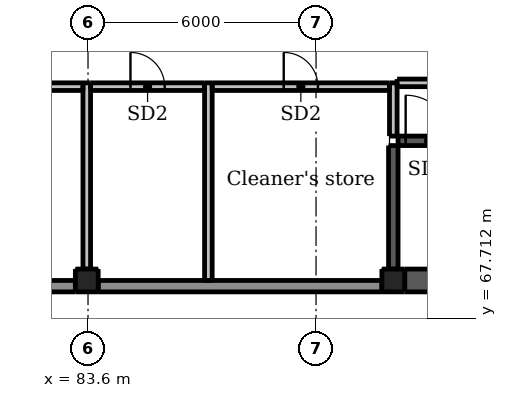
"""IFC4 building model, lengths in metres.
Left out: names, types, materials, properties, quantities, classifications, styles, units other than length and angle.
Written with IfcOpenShell. Run it as: python <this file> out.ifc"""

import sys

from ifc_helpers import new_model, si_unit, direction, frame, frame_2d, origin, origin_2d, place, context, subcontext, project, spatial, rectangle, extrude, element, fill, save


model = new_model("IFC4")
c1 = context("Model", 3, precision=1e-05, world=origin(), true_north=direction((0.0, 1.0)))
c2 = subcontext(c1, "Body", "Model", "MODEL_VIEW")
j1 = project(units=[si_unit("LENGTHUNIT", "METRE"), si_unit("PLANEANGLEUNIT", "RADIAN")], contexts=[c1])
p1 = place(None, origin())
s1 = spatial("IfcSite", under=j1, at=p1, CompositionType="ELEMENT")
p2 = place(p1, origin())
s2 = spatial("IfcBuilding", under=s1, at=p2, CompositionType="ELEMENT")
p3 = place(p2, origin())
s3 = spatial("IfcBuildingStorey", under=s2, at=p3, CompositionType="ELEMENT", Elevation=0.0)
for number, where, z_axis, x_axis in (
    (1, (83.6, 67.4, -2.5), (0.0, 0.0, 1.0), (1.0, 0.0, 0.0)),
    (2, (89.6, 67.4, -2.5), (0.0, 0.0, 1.0), (1.0, 0.0, 0.0)),
):
    element("IfcColumn", number, at=place(p3, frame(where, z_axis=z_axis, x_axis=x_axis)), inside=s3, PredefinedType="COLUMN", context=c2, shape_type="SweptSolid", body=[
        extrude(rectangle(XDim=1.2, YDim=1.2, at=origin_2d()), origin(), (0.0, 0.0, 1.0), 7.7),
    ])
for number, where, z_axis, x_axis in (
    (3, (83.567, 68.7, -0.3), (0.0, 0.0, 1.0), (1.0, 0.0, 0.0)),
    (4, (91.633, 68.7, -0.3), (0.0, 0.0, 1.0), (1.0, 0.0, 0.0)),
):
    element("IfcColumn", number, at=place(p3, frame(where, z_axis=z_axis, x_axis=x_axis)), inside=s3, PredefinedType="COLUMN", context=c2, shape_type="SweptSolid", body=[
        extrude(rectangle(XDim=0.6, YDim=0.6, at=origin_2d()), origin(), (0.0, 0.0, 1.0), 5.5),
    ])
p4 = place(p3, frame((91.758, 72.375, -0.3), z_axis=(0.0, 0.0, 1.0), x_axis=(1.0, 0.0, 0.0)))
e5 = element("IfcWall", 5, at=p4, inside=s3, PredefinedType="SHEAR", context=c2, shape_type="SweptSolid", body=[
    extrude(rectangle(XDim=7.642, YDim=0.25, at=frame_2d((3.821, 0.0))), origin(), (0.0, 0.0, 1.0), 5.5),
])
p5 = place(p4, frame((0.2, 0.0, 0.3)))
e6 = element("IfcOpeningElement", 6, at=p5, cuts=e5, PredefinedType="OPENING", context=c2, shape_type="SweptSolid", body=[
    extrude(rectangle(XDim=1.2, YDim=2.1, at=frame_2d((0.6, 1.05))), frame((0.0, 0.135, 0.0), z_axis=(0.0, -1.0, 0.0), x_axis=(1.0, 0.0, 0.0)), (0.0, 0.0, 1.0), 0.27),
])
p6 = place(p3, frame((91.633, 69.0, -0.3), z_axis=(0.0, 0.0, 1.0), x_axis=(0.0, 1.0, 0.0)))
e7 = element("IfcWall", 7, at=p6, inside=s3, PredefinedType="SHEAR", context=c2, shape_type="SweptSolid", body=[
    extrude(rectangle(XDim=3.25, YDim=0.25, at=frame_2d((1.625, 0.0))), origin(), (0.0, 0.0, 1.0), 5.5),
])
p7 = place(p3, frame((91.933, 68.7, -0.3), z_axis=(0.0, 0.0, 1.0), x_axis=(1.0, 0.0, 0.0)))
e8 = element("IfcWall", 8, at=p7, inside=s3, PredefinedType="SHEAR", context=c2, shape_type="SweptSolid", body=[
    extrude(rectangle(XDim=7.467, YDim=0.6, at=frame_2d((3.733, 0.0))), origin(), (0.0, 0.0, 1.0), 5.5),
])
for number, where, z_axis, x_axis in (
    (9, (78.2, 67.875, 0.0), (0.0, 0.0, 1.0), (1.0, 0.0, 0.0)),
    (10, (84.2, 67.875, 0.0), (0.0, 0.0, 1.0), (1.0, 0.0, 0.0)),
):
    element("IfcWall", number, at=place(p3, frame(where, z_axis=z_axis, x_axis=x_axis)), inside=s3, PredefinedType="SOLIDWALL", context=c2, shape_type="SweptSolid", body=[
        extrude(rectangle(XDim=4.8, YDim=0.25, at=frame_2d((2.4, 0.0))), origin(), (0.0, 0.0, 1.0), 5.2),
    ])
p8 = place(p3, frame((90.2, 67.875, 0.0), z_axis=(0.0, 0.0, 1.0), x_axis=(1.0, 0.0, 0.0)))
e11 = element("IfcWall", 11, at=p8, inside=s3, PredefinedType="SOLIDWALL", context=c2, shape_type="SweptSolid", body=[
    extrude(rectangle(XDim=9.8, YDim=0.25, at=frame_2d((4.9, 0.0))), origin(), (0.0, 0.0, 1.0), 5.2),
])
p9 = place(p3, frame((75.8, 68.55, 0.0), z_axis=(0.0, 0.0, 1.0), x_axis=(1.0, 0.0, 0.0)))
e12 = element("IfcWall", 12, at=p9, inside=s3, PredefinedType="SOLIDWALL", context=c2, shape_type="SweptSolid", body=[
    extrude(rectangle(XDim=7.467, YDim=0.3, at=frame_2d((3.733, 0.0))), origin(), (0.0, 0.0, 1.0), 4.3),
])
p10 = place(p3, frame((83.867, 68.55, 0.0), z_axis=(0.0, 0.0, 1.0), x_axis=(1.0, 0.0, 0.0)))
e13 = element("IfcWall", 13, at=p10, inside=s3, PredefinedType="SOLIDWALL", context=c2, shape_type="SweptSolid", body=[
    extrude(rectangle(XDim=7.466, YDim=0.3, at=frame_2d((3.733, 0.0))), origin(), (0.0, 0.0, 1.0), 4.3),
])
p11 = place(p3, frame((75.6, 73.8, 0.0), z_axis=(0.0, 0.0, 1.0), x_axis=(1.0, 0.0, 0.0)))
e14 = element("IfcWall", 14, at=p11, inside=s3, PredefinedType="PARTITIONING", context=c2, shape_type="SweptSolid", body=[
    extrude(rectangle(XDim=7.867, YDim=0.2, at=frame_2d((3.934, 0.0))), origin(), (0.0, 0.0, 1.0), 4.1),
])
p12 = place(p11, frame((3.483, 0.0, 0.0)))
e15 = element("IfcOpeningElement", 15, at=p12, cuts=e14, PredefinedType="OPENING", context=c2, shape_type="SweptSolid", body=[
    extrude(rectangle(XDim=0.9, YDim=2.1, at=frame_2d((0.45, 1.05))), frame((0.0, 0.11, 0.0), z_axis=(0.0, -1.0, 0.0), x_axis=(1.0, 0.0, 0.0)), (0.0, 0.0, 1.0), 0.22),
])
p13 = place(p3, frame((83.667, 73.8, 0.0), z_axis=(0.0, 0.0, 1.0), x_axis=(1.0, 0.0, 0.0)))
e16 = element("IfcWall", 16, at=p13, inside=s3, PredefinedType="PARTITIONING", context=c2, shape_type="SweptSolid", body=[
    extrude(rectangle(XDim=3.0, YDim=0.2, at=frame_2d((1.5, 0.0))), origin(), (0.0, 0.0, 1.0), 4.1),
])
p14 = place(p13, frame((1.05, 0.0, 0.0)))
e17 = element("IfcOpeningElement", 17, at=p14, cuts=e16, PredefinedType="OPENING", context=c2, shape_type="SweptSolid", body=[
    extrude(rectangle(XDim=0.9, YDim=2.1, at=frame_2d((0.45, 1.05))), frame((0.0, 0.11, 0.0), z_axis=(0.0, -1.0, 0.0), x_axis=(1.0, 0.0, 0.0)), (0.0, 0.0, 1.0), 0.22),
])
p15 = place(p3, frame((86.867, 73.8, 0.0), z_axis=(0.0, 0.0, 1.0), x_axis=(1.0, 0.0, 0.0)))
e18 = element("IfcWall", 18, at=p15, inside=s3, PredefinedType="PARTITIONING", context=c2, shape_type="SweptSolid", body=[
    extrude(rectangle(XDim=4.666, YDim=0.2, at=frame_2d((2.333, 0.0))), origin(), (0.0, 0.0, 1.0), 4.1),
])
p16 = place(p15, frame((1.883, 0.0, 0.0)))
e19 = element("IfcOpeningElement", 19, at=p16, cuts=e18, PredefinedType="OPENING", context=c2, shape_type="SweptSolid", body=[
    extrude(rectangle(XDim=0.9, YDim=2.1, at=frame_2d((0.45, 1.05))), frame((0.0, 0.11, 0.0), z_axis=(0.0, -1.0, 0.0), x_axis=(1.0, 0.0, 0.0)), (0.0, 0.0, 1.0), 0.22),
])
p17 = place(p3, frame((83.567, 69.0, 0.0), z_axis=(0.0, 0.0, 1.0), x_axis=(0.0, 1.0, 0.0)))
e20 = element("IfcWall", 20, at=p17, inside=s3, PredefinedType="PARTITIONING", context=c2, shape_type="SweptSolid", body=[
    extrude(rectangle(XDim=4.9, YDim=0.2, at=frame_2d((2.45, 0.0))), origin(), (0.0, 0.0, 1.0), 4.1),
])
p18 = place(p3, frame((91.633, 72.5, 0.0), z_axis=(0.0, 0.0, 1.0), x_axis=(0.0, 1.0, 0.0)))
e21 = element("IfcWall", 21, at=p18, inside=s3, PredefinedType="PARTITIONING", context=c2, shape_type="SweptSolid", body=[
    extrude(rectangle(XDim=1.4, YDim=0.2, at=frame_2d((0.7, 0.0))), origin(), (0.0, 0.0, 1.0), 4.1),
])
p19 = place(p3, frame((86.767, 68.7, 0.0), z_axis=(0.0, 0.0, 1.0), x_axis=(0.0, 1.0, 0.0)))
e22 = element("IfcWall", 22, at=p19, inside=s3, PredefinedType="PARTITIONING", context=c2, shape_type="SweptSolid", body=[
    extrude(rectangle(XDim=5.2, YDim=0.2, at=frame_2d((2.6, 0.0))), origin(), (0.0, 0.0, 1.0), 4.1),
])
p20 = place(p3, frame((91.733, 73.9, 0.0), z_axis=(0.0, 0.0, 1.0), x_axis=(1.0, 0.0, 0.0)))
e23 = element("IfcWall", 23, at=p20, inside=s3, PredefinedType="PARTITIONING", context=c2, shape_type="SweptSolid", body=[
    extrude(rectangle(XDim=7.867, YDim=0.2, at=frame_2d((3.934, 0.0))), origin(), (0.0, 0.0, 1.0), 4.1),
])
p21 = place(p20, frame((3.434, 0.0, 0.0)))
e24 = element("IfcOpeningElement", 24, at=p21, cuts=e23, PredefinedType="OPENING", context=c2, shape_type="SweptSolid", body=[
    extrude(rectangle(XDim=1.0, YDim=2.1, at=frame_2d((0.5, 1.05))), frame((0.0, 0.11, 0.0), z_axis=(0.0, -1.0, 0.0), x_axis=(1.0, 0.0, 0.0)), (0.0, 0.0, 1.0), 0.22),
])
p22 = place(p14, origin())
e25 = element("IfcDoor", 25, at=p22, inside=s3, OperationType="SINGLE_SWING_LEFT", PredefinedType="DOOR", context=c2, shape_type="SweptSolid", body=[
    extrude(rectangle(XDim=0.9, YDim=2.1, at=frame_2d((0.45, 1.05))), frame((0.0, 0.025, 0.0), z_axis=(0.0, -1.0, 0.0), x_axis=(1.0, 0.0, 0.0)), (0.0, 0.0, 1.0), 0.05),
])
fill(e17, e25)
p23 = place(p16, origin())
e26 = element("IfcDoor", 26, at=p23, inside=s3, OperationType="SINGLE_SWING_LEFT", PredefinedType="DOOR", context=c2, shape_type="SweptSolid", body=[
    extrude(rectangle(XDim=0.9, YDim=2.1, at=frame_2d((0.45, 1.05))), frame((0.0, 0.025, 0.0), z_axis=(0.0, -1.0, 0.0), x_axis=(1.0, 0.0, 0.0)), (0.0, 0.0, 1.0), 0.05),
])
fill(e19, e26)
p24 = place(p5, origin())
e27 = element("IfcDoor", 27, at=p24, inside=s3, OperationType="SINGLE_SWING_LEFT", PredefinedType="DOOR", context=c2, shape_type="SweptSolid", body=[
    extrude(rectangle(XDim=1.2, YDim=2.1, at=frame_2d((0.6, 1.05))), frame((0.0, 0.025, 0.0), z_axis=(0.0, -1.0, 0.0), x_axis=(1.0, 0.0, 0.0)), (0.0, 0.0, 1.0), 0.05),
])
fill(e6, e27)
save(model, sys.argv[1])
